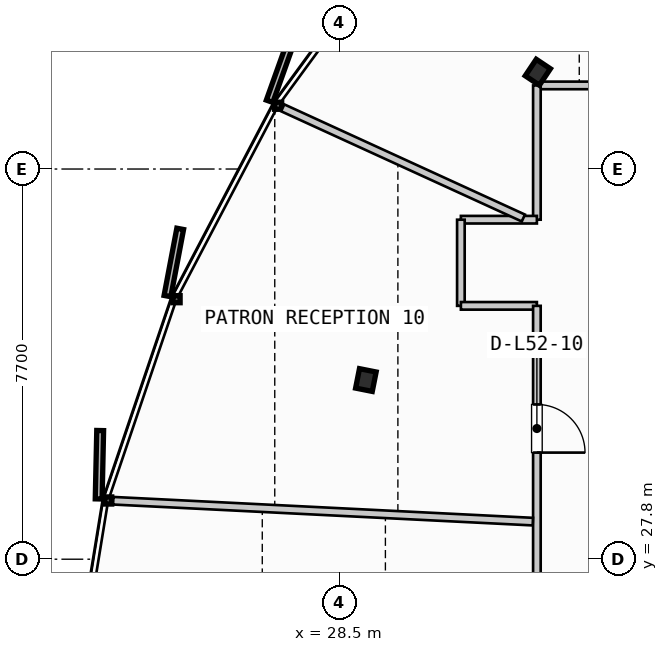
"""IFC4 building model, lengths in metres.
Left out: names, types, materials, properties, quantities, classifications, styles, units other than length and angle.
Written with IfcOpenShell. Run it as: python <this file> out.ifc"""

import sys

from ifc_helpers import new_model, si_unit, direction, frame, frame_2d, origin, origin_2d, place, context, subcontext, project, spatial, rectangle, i_section, extrude, source, transform, mapped, element, fill, save


model = new_model("IFC4")
c1 = context("Model", 3, precision=1e-05, world=origin(), true_north=direction((0.0, 1.0)))
c2 = subcontext(c1, "Body", "Model", "MODEL_VIEW")
j1 = project(units=[si_unit("LENGTHUNIT", "METRE"), si_unit("PLANEANGLEUNIT", "RADIAN")], contexts=[c1])
p1 = place(None, origin())
s1 = spatial("IfcSite", under=j1, at=p1, CompositionType="ELEMENT")
p2 = place(p1, origin())
s2 = spatial("IfcBuilding", under=s1, at=p2, CompositionType="ELEMENT")
p3 = place(p2, frame((0.0, 0.0, 200.9)))
s3 = spatial("IfcBuildingStorey", under=s2, at=p3, CompositionType="ELEMENT", Elevation=200.9)
m1 = source(origin(), c2, "Body", "SweptSolid", [
    extrude(i_section(OverallWidth=0.391, OverallDepth=0.335, WebThickness=0.023, FlangeThickness=0.034, FilletRadius=0.015, at=origin_2d()), origin(), (0.0, 0.0, 1.0), 3.26),
])
for number, where, z_axis, x_axis in (
    (1, (32.418, 37.409, 0.0), (0.0, 0.0, 1.0), (-0.831, 0.556, 0.0)),
    (2, (29.025, 31.336, 0.0), (0.0, 0.0, 1.0), (-0.981, 0.195, 0.0)),
):
    element("IfcColumn", number, at=place(p3, frame(where, z_axis=z_axis, x_axis=x_axis)), inside=s3, PredefinedType="COLUMN", context=c2, shape_type="MappedRepresentation", body=[
        mapped(m1, transform((0.0, 0.0, 0.0), scale=1.0)),
    ])
p4 = place(p3, frame((60.75, 37.15, 0.0), z_axis=(0.0, 0.0, 1.0), x_axis=(-1.0, 0.0, 0.0)))
e3 = element("IfcWall", 3, at=p4, inside=s3, PredefinedType="PARTITIONING", context=c2, shape_type="SweptSolid", body=[
    extrude(rectangle(XDim=28.35, YDim=0.15, at=frame_2d((14.175, 0.0))), origin(), (0.0, 0.0, 1.0), 2.595),
])
p5 = place(p4, frame((2.766, 0.0, 0.0)))
e4 = element("IfcOpeningElement", 4, at=p5, cuts=e3, PredefinedType="OPENING", context=c2, shape_type="SweptSolid", body=[
    extrude(rectangle(XDim=0.95, YDim=2.15, at=frame_2d((0.475, 1.075))), frame((0.0, 0.085, 0.0), z_axis=(0.0, -1.0, 0.0), x_axis=(1.0, 0.0, 0.0)), (0.0, 0.0, 1.0), 0.17),
])
p6 = place(p4, frame((8.968, 0.0, 0.0)))
e5 = element("IfcOpeningElement", 5, at=p6, cuts=e3, PredefinedType="OPENING", context=c2, shape_type="SweptSolid", body=[
    extrude(rectangle(XDim=0.95, YDim=2.15, at=frame_2d((0.475, 1.075))), frame((0.0, 0.085, 0.0), z_axis=(0.0, -1.0, 0.0), x_axis=(1.0, 0.0, 0.0)), (0.0, 0.0, 1.0), 0.17),
])
p7 = place(p4, frame((13.496, 0.0, 0.0)))
e6 = element("IfcOpeningElement", 6, at=p7, cuts=e3, PredefinedType="OPENING", context=c2, shape_type="SweptSolid", body=[
    extrude(rectangle(XDim=0.95, YDim=2.15, at=frame_2d((0.475, 1.075))), frame((0.0, 0.085, 0.0), z_axis=(0.0, -1.0, 0.0), x_axis=(1.0, 0.0, 0.0)), (0.0, 0.0, 1.0), 0.17),
])
p8 = place(p4, frame((16.571, 0.0, 0.0)))
e7 = element("IfcOpeningElement", 7, at=p8, cuts=e3, PredefinedType="OPENING", context=c2, shape_type="SweptSolid", body=[
    extrude(rectangle(XDim=0.95, YDim=2.15, at=frame_2d((0.475, 1.075))), frame((0.0, 0.085, 0.0), z_axis=(0.0, -1.0, 0.0), x_axis=(1.0, 0.0, 0.0)), (0.0, 0.0, 1.0), 0.17),
])
p9 = place(p4, frame((23.002, 0.0, 0.0)))
e8 = element("IfcOpeningElement", 8, at=p9, cuts=e3, PredefinedType="OPENING", context=c2, shape_type="SweptSolid", body=[
    extrude(rectangle(XDim=0.95, YDim=2.15, at=frame_2d((0.475, 1.075))), frame((0.0, 0.085, 0.0), z_axis=(0.0, -1.0, 0.0), x_axis=(1.0, 0.0, 0.0)), (0.0, 0.0, 1.0), 0.17),
])
p10 = place(p3, frame((32.4, 37.15, 0.0), z_axis=(0.0, 0.0, 1.0), x_axis=(0.0, -1.0, 0.0)))
e9 = element("IfcWall", 9, at=p10, inside=s3, PredefinedType="PARTITIONING", context=c2, shape_type="SweptSolid", body=[
    extrude(rectangle(XDim=2.65, YDim=0.15, at=frame_2d((1.325, 0.0))), origin(), (0.0, 0.0, 1.0), 2.595),
])
p11 = place(p3, frame((32.4, 34.5, 0.0), z_axis=(0.0, 0.0, 1.0), x_axis=(-1.0, 0.0, 0.0)))
e10 = element("IfcWall", 10, at=p11, inside=s3, PredefinedType="PARTITIONING", context=c2, shape_type="SweptSolid", body=[
    extrude(rectangle(XDim=1.5, YDim=0.15, at=frame_2d((0.75, 0.0))), origin(), (0.0, 0.0, 1.0), 2.595),
])
p12 = place(p3, frame((30.9, 34.5, 0.0), z_axis=(0.0, 0.0, 1.0), x_axis=(0.0, -1.0, 0.0)))
e11 = element("IfcWall", 11, at=p12, inside=s3, PredefinedType="PARTITIONING", context=c2, shape_type="SweptSolid", body=[
    extrude(rectangle(XDim=1.7, YDim=0.15, at=frame_2d((0.85, 0.0))), origin(), (0.0, 0.0, 1.0), 2.595),
])
p13 = place(p3, frame((30.9, 32.8, 0.0), z_axis=(0.0, 0.0, 1.0), x_axis=(1.0, 0.0, 0.0)))
e12 = element("IfcWall", 12, at=p13, inside=s3, PredefinedType="PARTITIONING", context=c2, shape_type="SweptSolid", body=[
    extrude(rectangle(XDim=1.5, YDim=0.15, at=frame_2d((0.75, 0.0))), origin(), (0.0, 0.0, 1.0), 2.595),
])
p14 = place(p3, frame((32.4, 32.8, 0.0), z_axis=(0.0, 0.0, 1.0), x_axis=(0.0, -1.0, 0.0)))
e13 = element("IfcWall", 13, at=p14, inside=s3, PredefinedType="PARTITIONING", context=c2, shape_type="SweptSolid", body=[
    extrude(rectangle(XDim=10.0, YDim=0.15, at=frame_2d((5.0, 0.0))), origin(), (0.0, 0.0, 1.0), 2.595),
])
p15 = place(p14, frame((1.946, 0.0, 0.0)))
e14 = element("IfcOpeningElement", 14, at=p15, cuts=e13, PredefinedType="OPENING", context=c2, shape_type="SweptSolid", body=[
    extrude(rectangle(XDim=0.95, YDim=2.15, at=frame_2d((0.475, 1.075))), frame((0.0, 0.085, 0.0), z_axis=(0.0, -1.0, 0.0), x_axis=(1.0, 0.0, 0.0)), (0.0, 0.0, 1.0), 0.17),
])
p16 = place(p14, frame((6.366, 0.0, 0.0)))
e15 = element("IfcOpeningElement", 15, at=p16, cuts=e13, PredefinedType="OPENING", context=c2, shape_type="SweptSolid", body=[
    extrude(rectangle(XDim=0.95, YDim=2.15, at=frame_2d((0.475, 1.075))), frame((0.0, 0.085, 0.0), z_axis=(0.0, -1.0, 0.0), x_axis=(1.0, 0.0, 0.0)), (0.0, 0.0, 1.0), 0.17),
])
p17 = place(p3, frame((32.133, 34.533, 0.0), z_axis=(0.0, 0.0, 1.0), x_axis=(-0.909241040679, 0.416270020474, 0.0)))
e16 = element("IfcWall", 16, at=p17, inside=s3, PredefinedType="PARTITIONING", context=c2, shape_type="SweptSolid", body=[
    extrude(rectangle(XDim=5.223, YDim=0.15, at=frame_2d((2.612, 0.0))), origin(), (0.0, 0.0, 1.0), 2.595),
])
p18 = place(p3, frame((32.32, 28.542, 0.0), z_axis=(0.0, 0.0, 1.0), x_axis=(-0.998762524817, 0.049733479891, 0.0)))
e17 = element("IfcWall", 17, at=p18, inside=s3, PredefinedType="PARTITIONING", context=c2, shape_type="SweptSolid", body=[
    extrude(rectangle(XDim=8.291, YDim=0.15, at=frame_2d((4.146, 0.0))), origin(), (0.0, 0.0, 1.0), 2.595),
])
m2 = source(origin(), c2, "Body", "SweptSolid", [
    extrude(rectangle(XDim=0.95, YDim=2.15, at=frame_2d((0.475, 1.075))), frame((0.0, 0.025, 0.0), z_axis=(0.0, -1.0, 0.0), x_axis=(1.0, 0.0, 0.0)), (0.0, 0.0, 1.0), 0.05),
])
p19 = place(p15, origin())
e18 = element("IfcDoor", 18, at=p19, inside=s3, OperationType="SINGLE_SWING_RIGHT", PredefinedType="DOOR", context=c2, shape_type="MappedRepresentation", body=[
    mapped(m2, transform((0.0, 0.0, 0.0), scale=1.0)),
])
fill(e14, e18)
save(model, sys.argv[1])
